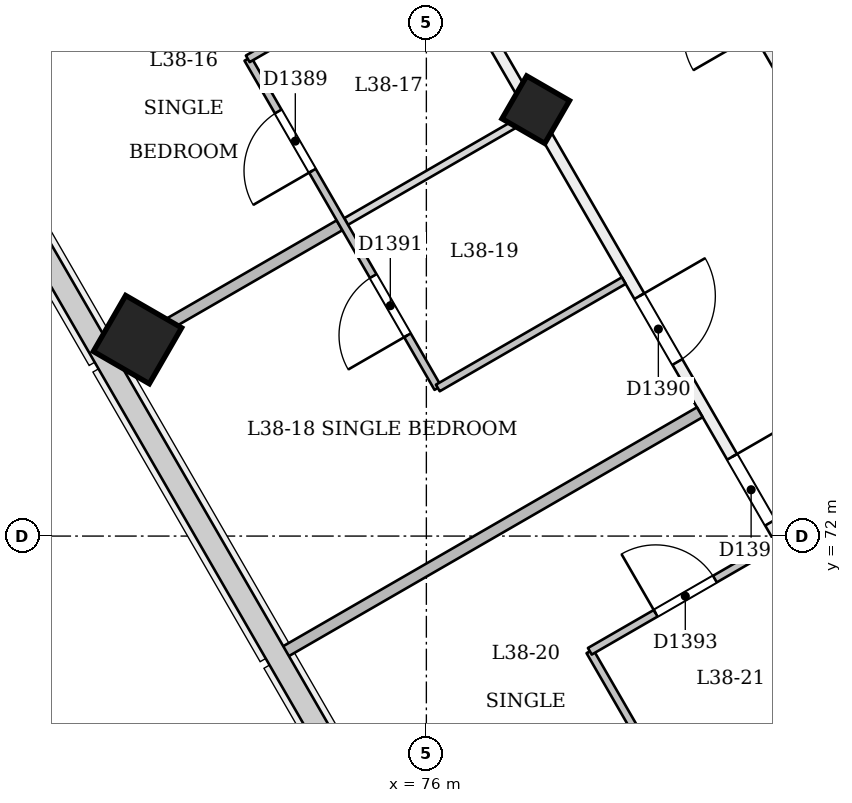
"""IFC4 building model, lengths in metres.
Left out: names, types, materials, properties, quantities, classifications, styles, units other than length and angle.
Written with IfcOpenShell. Run it as: python <this file> out.ifc"""

import sys

from ifc_helpers import new_model, si_unit, direction, frame, frame_2d, origin, origin_2d, place, context, subcontext, project, spatial, rectangle, extrude, element, fill, save


model = new_model("IFC4")
c1 = context("Model", 3, precision=1e-05, world=origin(), true_north=direction((0.0, 1.0)))
c2 = subcontext(c1, "Body", "Model", "MODEL_VIEW")
j1 = project(units=[si_unit("LENGTHUNIT", "METRE"), si_unit("PLANEANGLEUNIT", "RADIAN")], contexts=[c1])
p1 = place(None, origin())
s1 = spatial("IfcSite", under=j1, at=p1, CompositionType="ELEMENT")
p2 = place(p1, origin())
s2 = spatial("IfcBuilding", under=s1, at=p2, CompositionType="ELEMENT")
p3 = place(p2, frame((0.0, 0.0, 149.4)))
s3 = spatial("IfcBuildingStorey", under=s2, at=p3, CompositionType="ELEMENT", Elevation=149.4)
p4 = place(p3, frame((77.412, 77.563, -0.02), z_axis=(0.022222910879, 0.038415824599, 0.999014697916), x_axis=(-0.866021322354, -0.498527672539, 0.038434736118)))
e1 = element("IfcColumn", 1, at=p4, inside=s3, PredefinedType="COLUMN", context=c2, shape_type="SweptSolid", body=[
    extrude(rectangle(XDim=0.65, YDim=0.65, at=origin_2d()), origin(), (0.0, 0.0, 1.0), 3.604),
])
p5 = place(p3, frame((72.172, 74.537, -0.026), z_axis=(0.022155133694, 0.038483534979, 0.999013597298), x_axis=(-0.864979679845, -0.500331165571, 0.038456185646)))
e2 = element("IfcColumn", 2, at=p5, inside=s3, PredefinedType="COLUMN", context=c2, shape_type="SweptSolid", body=[
    extrude(rectangle(XDim=0.85, YDim=0.85, at=origin_2d()), origin(), (0.0, 0.0, 1.0), 3.604),
])
p6 = place(p3, frame((85.0, 70.621, 0.0), z_axis=(0.0, 0.0, 1.0), x_axis=(-0.500003200507, 0.866023555963, 0.0)))
e3 = element("IfcWall", 3, at=p6, inside=s3, PredefinedType="PARTITIONING", context=c2, shape_type="SweptSolid", body=[
    extrude(rectangle(XDim=22.608, YDim=0.15, at=frame_2d((11.304, 0.0))), origin(), (0.0, 0.0, 1.0), 3.15),
])
p7 = place(p6, frame((12.79, 0.0, 0.0)))
e4 = element("IfcOpeningElement", 4, at=p7, cuts=e3, PredefinedType="OPENING", context=c2, shape_type="SweptSolid", body=[
    extrude(rectangle(XDim=0.9, YDim=2.1, at=frame_2d((0.45, 1.05))), frame((0.0, 0.085, 0.0), z_axis=(0.0, -1.0, 0.0), x_axis=(1.0, 0.0, 0.0)), (0.0, 0.0, 1.0), 0.171),
])
p8 = place(p6, frame((19.298, 0.0, 0.0)))
e5 = element("IfcOpeningElement", 5, at=p8, cuts=e3, PredefinedType="OPENING", context=c2, shape_type="SweptSolid", body=[
    extrude(rectangle(XDim=0.9, YDim=2.1, at=frame_2d((0.45, 1.05))), frame((0.0, 0.085, 0.0), z_axis=(0.0, -1.0, 0.0), x_axis=(1.0, 0.0, 0.0)), (0.0, 0.0, 1.0), 0.171),
])
p9 = place(p6, frame((2.619, 0.0, 0.0)))
e6 = element("IfcOpeningElement", 6, at=p9, cuts=e3, PredefinedType="OPENING", context=c2, shape_type="SweptSolid", body=[
    extrude(rectangle(XDim=1.0, YDim=2.1, at=frame_2d((0.5, 1.05))), frame((0.0, 0.085, 0.0), z_axis=(0.0, -1.0, 0.0), x_axis=(1.0, 0.0, 0.0)), (0.0, 0.0, 1.0), 0.171),
])
p10 = place(p6, frame((16.21, 0.0, 0.0)))
e7 = element("IfcOpeningElement", 7, at=p10, cuts=e3, PredefinedType="OPENING", context=c2, shape_type="SweptSolid", body=[
    extrude(rectangle(XDim=1.0, YDim=2.1, at=frame_2d((0.5, 1.05))), frame((0.0, 0.085, 0.0), z_axis=(0.0, -1.0, 0.0), x_axis=(1.0, 0.0, 0.0)), (0.0, 0.0, 1.0), 0.171),
])
p11 = place(p6, frame((9.246, 0.0, 0.0)))
e8 = element("IfcOpeningElement", 8, at=p11, cuts=e3, PredefinedType="OPENING", context=c2, shape_type="SweptSolid", body=[
    extrude(rectangle(XDim=1.0, YDim=2.1, at=frame_2d((0.5, 1.05))), frame((0.0, 0.085, 0.0), z_axis=(0.0, -1.0, 0.0), x_axis=(1.0, 0.0, 0.0)), (0.0, 0.0, 1.0), 0.171),
])
p12 = place(p6, frame((5.892, 0.0, 0.0)))
e9 = element("IfcOpeningElement", 9, at=p12, cuts=e3, PredefinedType="OPENING", context=c2, shape_type="SweptSolid", body=[
    extrude(rectangle(XDim=1.0, YDim=2.1, at=frame_2d((0.5, 1.05))), frame((0.0, 0.085, 0.0), z_axis=(0.0, -1.0, 0.0), x_axis=(1.0, 0.0, 0.0)), (0.0, 0.0, 1.0), 0.171),
])
p13 = place(p3, frame((65.324, 98.5, 0.0), z_axis=(0.0, 0.0, 1.0), x_axis=(0.500001898363, -0.866024307761, 0.0)))
e10 = element("IfcWall", 10, at=p13, inside=s3, PredefinedType="PARTITIONING", context=c2, shape_type="SweptSolid", body=[
    extrude(rectangle(XDim=39.351, YDim=0.15, at=frame_2d((19.675, 0.0))), origin(), (0.0, 0.0, 1.0), 2.75),
])
p14 = place(p13, frame((0.2, 0.0, 0.0)))
e11 = element("IfcOpeningElement", 11, at=p14, cuts=e10, PredefinedType="OPENING", context=c2, shape_type="SweptSolid", body=[
    extrude(rectangle(XDim=1.2, YDim=2.1, at=frame_2d((0.6, 1.05))), frame((0.0, 0.085, 0.0), z_axis=(0.0, -1.0, 0.0), x_axis=(1.0, 0.0, 0.0)), (0.0, 0.0, 1.0), 0.171),
])
p15 = place(p13, frame((3.425, 0.0, 0.0)))
e12 = element("IfcOpeningElement", 12, at=p15, cuts=e10, PredefinedType="OPENING", context=c2, shape_type="SweptSolid", body=[
    extrude(rectangle(XDim=1.0, YDim=2.1, at=frame_2d((0.5, 1.05))), frame((0.0, 0.085, 0.0), z_axis=(0.0, -1.0, 0.0), x_axis=(1.0, 0.0, 0.0)), (0.0, 0.0, 1.0), 0.171),
])
p16 = place(p13, frame((9.004, 0.0, 0.0)))
e13 = element("IfcOpeningElement", 13, at=p16, cuts=e10, PredefinedType="OPENING", context=c2, shape_type="SweptSolid", body=[
    extrude(rectangle(XDim=1.1, YDim=2.1, at=frame_2d((0.55, 1.05))), frame((0.0, 0.085, 0.0), z_axis=(0.0, -1.0, 0.0), x_axis=(1.0, 0.0, 0.0)), (0.0, 0.0, 1.0), 0.171),
])
p17 = place(p13, frame((11.396, 0.0, 0.0)))
e14 = element("IfcOpeningElement", 14, at=p17, cuts=e10, PredefinedType="OPENING", context=c2, shape_type="SweptSolid", body=[
    extrude(rectangle(XDim=1.0, YDim=2.1, at=frame_2d((0.5, 1.05))), frame((0.0, 0.085, 0.0), z_axis=(0.0, -1.0, 0.0), x_axis=(1.0, 0.0, 0.0)), (0.0, 0.0, 1.0), 0.171),
])
p18 = place(p13, frame((17.955, 0.0, 0.0)))
e15 = element("IfcOpeningElement", 15, at=p18, cuts=e10, PredefinedType="OPENING", context=c2, shape_type="SweptSolid", body=[
    extrude(rectangle(XDim=1.0, YDim=2.1, at=frame_2d((0.5, 1.05))), frame((0.0, 0.085, 0.0), z_axis=(0.0, -1.0, 0.0), x_axis=(1.0, 0.0, 0.0)), (0.0, 0.0, 1.0), 0.171),
])
p19 = place(p13, frame((20.396, 0.0, 0.0)))
e16 = element("IfcOpeningElement", 16, at=p19, cuts=e10, PredefinedType="OPENING", context=c2, shape_type="SweptSolid", body=[
    extrude(rectangle(XDim=1.0, YDim=2.1, at=frame_2d((0.5, 1.05))), frame((0.0, 0.085, 0.0), z_axis=(0.0, -1.0, 0.0), x_axis=(1.0, 0.0, 0.0)), (0.0, 0.0, 1.0), 0.171),
])
p20 = place(p13, frame((26.955, 0.0, 0.0)))
e17 = element("IfcOpeningElement", 17, at=p20, cuts=e10, PredefinedType="OPENING", context=c2, shape_type="SweptSolid", body=[
    extrude(rectangle(XDim=1.0, YDim=2.1, at=frame_2d((0.5, 1.05))), frame((0.0, 0.085, 0.0), z_axis=(0.0, -1.0, 0.0), x_axis=(1.0, 0.0, 0.0)), (0.0, 0.0, 1.0), 0.171),
])
p21 = place(p13, frame((29.396, 0.0, 0.0)))
e18 = element("IfcOpeningElement", 18, at=p21, cuts=e10, PredefinedType="OPENING", context=c2, shape_type="SweptSolid", body=[
    extrude(rectangle(XDim=1.0, YDim=2.1, at=frame_2d((0.5, 1.05))), frame((0.0, 0.085, 0.0), z_axis=(0.0, -1.0, 0.0), x_axis=(1.0, 0.0, 0.0)), (0.0, 0.0, 1.0), 0.171),
])
p22 = place(p13, frame((36.004, 0.0, 0.0)))
e19 = element("IfcOpeningElement", 19, at=p22, cuts=e10, PredefinedType="OPENING", context=c2, shape_type="SweptSolid", body=[
    extrude(rectangle(XDim=1.1, YDim=2.1, at=frame_2d((0.55, 1.05))), frame((0.0, 0.085, 0.0), z_axis=(0.0, -1.0, 0.0), x_axis=(1.0, 0.0, 0.0)), (0.0, 0.0, 1.0), 0.171),
])
p23 = place(p3, frame((69.602, 78.25, 0.0), z_axis=(0.0, 0.0, 1.0), x_axis=(0.866025401434, 0.500000004071, 0.0)))
e20 = element("IfcWall", 20, at=p23, inside=s3, PredefinedType="PARTITIONING", context=c2, shape_type="SweptSolid", body=[
    extrude(rectangle(XDim=6.345, YDim=0.15, at=frame_2d((3.173, 0.0))), origin(), (0.0, 0.0, 1.0), 2.65),
])
p24 = place(p3, frame((76.151, 73.948, 0.0), z_axis=(0.0, 0.0, 1.0), x_axis=(-0.500004234368, 0.866022959057, 0.0)))
e21 = element("IfcWall", 21, at=p24, inside=s3, PredefinedType="PARTITIONING", context=c2, shape_type="SweptSolid", body=[
    extrude(rectangle(XDim=5.0, YDim=0.1, at=frame_2d((2.5, 0.0))), origin(), (0.0, 0.0, 1.0), 2.75),
])
p25 = place(p24, frame((3.3, 0.0, 0.0)))
e22 = element("IfcOpeningElement", 22, at=p25, cuts=e21, PredefinedType="OPENING", context=c2, shape_type="SweptSolid", body=[
    extrude(rectangle(XDim=0.9, YDim=2.1, at=frame_2d((0.45, 1.05))), frame((0.0, 0.061, 0.0), z_axis=(0.0, -1.0, 0.0), x_axis=(1.0, 0.0, 0.0)), (0.0, 0.0, 1.0), 0.121),
])
p26 = place(p24, frame((0.8, 0.0, 0.0)))
e23 = element("IfcOpeningElement", 23, at=p26, cuts=e21, PredefinedType="OPENING", context=c2, shape_type="SweptSolid", body=[
    extrude(rectangle(XDim=0.9, YDim=2.1, at=frame_2d((0.45, 1.05))), frame((0.0, 0.061, 0.0), z_axis=(0.0, -1.0, 0.0), x_axis=(1.0, 0.0, 0.0)), (0.0, 0.0, 1.0), 0.121),
])
p27 = place(p3, frame((73.651, 78.279, 0.0), z_axis=(0.0, 0.0, 1.0), x_axis=(0.866048868473, 0.499959355765, 0.0)))
e24 = element("IfcWall", 24, at=p27, inside=s3, PredefinedType="PARTITIONING", context=c2, shape_type="SweptSolid", body=[
    extrude(rectangle(XDim=2.825, YDim=0.1, at=frame_2d((1.413, 0.0))), origin(), (0.0, 0.0, 1.0), 3.15),
])
p28 = place(p3, frame((71.87, 74.364, 0.0), z_axis=(0.0, 0.0, 1.0), x_axis=(0.866044174857, 0.499967486139, 0.0)))
e25 = element("IfcWall", 25, at=p28, inside=s3, PredefinedType="PARTITIONING", context=c2, shape_type="SweptSolid", body=[
    extrude(rectangle(XDim=3.45, YDim=0.15, at=frame_2d((1.725, 0.0))), origin(), (0.0, 0.0, 1.0), 2.65),
])
p29 = place(p3, frame((74.944, 76.138, 0.0), z_axis=(0.0, 0.0, 1.0), x_axis=(0.866042014628, 0.499971228071, 0.0)))
e26 = element("IfcWall", 26, at=p29, inside=s3, PredefinedType="PARTITIONING", context=c2, shape_type="SweptSolid", body=[
    extrude(rectangle(XDim=2.775, YDim=0.1, at=frame_2d((1.388, 0.0))), origin(), (0.0, 0.0, 1.0), 2.75),
])
p30 = place(p3, frame((78.597, 75.361, 0.0), z_axis=(0.0, 0.0, 1.0), x_axis=(-0.866048868473, -0.499959355765, 0.0)))
e27 = element("IfcWall", 27, at=p30, inside=s3, PredefinedType="PARTITIONING", context=c2, shape_type="SweptSolid", body=[
    extrude(rectangle(XDim=2.825, YDim=0.1, at=frame_2d((1.413, 0.0))), origin(), (0.0, 0.0, 1.0), 3.15),
])
p31 = place(p3, frame((74.102, 70.456, 0.0), z_axis=(0.0, 0.0, 1.0), x_axis=(0.866025401434, 0.500000004071, 0.0)))
e28 = element("IfcWall", 28, at=p31, inside=s3, PredefinedType="PARTITIONING", context=c2, shape_type="SweptSolid", body=[
    extrude(rectangle(XDim=6.345, YDim=0.15, at=frame_2d((3.173, 0.0))), origin(), (0.0, 0.0, 1.0), 2.65),
])
p32 = place(p3, frame((79.376, 68.363, 0.0), z_axis=(0.0, 0.0, 1.0), x_axis=(-0.499943856944, 0.866057815567, 0.0)))
e29 = element("IfcWall", 29, at=p32, inside=s3, PredefinedType="PARTITIONING", context=c2, shape_type="SweptSolid", body=[
    extrude(rectangle(XDim=2.45, YDim=0.1, at=frame_2d((1.225, 0.0))), origin(), (0.0, 0.0, 1.0), 2.75),
])
p33 = place(p3, frame((78.151, 70.484, 0.0), z_axis=(0.0, 0.0, 1.0), x_axis=(0.866048868473, 0.499959355765, 0.0)))
e30 = element("IfcWall", 30, at=p33, inside=s3, PredefinedType="PARTITIONING", context=c2, shape_type="SweptSolid", body=[
    extrude(rectangle(XDim=2.825, YDim=0.1, at=frame_2d((1.413, 0.0))), origin(), (0.0, 0.0, 1.0), 3.15),
])
p34 = place(p33, frame((1.0, 0.0, 0.0)))
e31 = element("IfcOpeningElement", 31, at=p34, cuts=e30, PredefinedType="OPENING", context=c2, shape_type="SweptSolid", body=[
    extrude(rectangle(XDim=0.9, YDim=2.1, at=frame_2d((0.45, 1.05))), frame((0.0, 0.061, 0.0), z_axis=(0.0, -1.0, 0.0), x_axis=(1.0, 0.0, 0.0)), (0.0, 0.0, 1.0), 0.121),
])
p35 = place(p3, frame((78.881, 68.019, 0.0), z_axis=(0.0, 0.0, 1.0), x_axis=(0.866050272892, 0.499956922968, 0.0)))
e32 = element("IfcWall", 32, at=p35, inside=s3, PredefinedType="PARTITIONING", context=c2, shape_type="SweptSolid", body=[
    extrude(rectangle(XDim=3.425, YDim=0.1, at=frame_2d((1.712, 0.0))), origin(), (0.0, 0.0, 1.0), 2.75),
])
p36 = place(p25, origin())
e33 = element("IfcDoor", 33, at=p36, inside=s3, OperationType="SINGLE_SWING_LEFT", PredefinedType="NOTDEFINED", context=c2, shape_type="SweptSolid", body=[
    extrude(rectangle(XDim=0.9, YDim=2.1, at=frame_2d((0.45, 1.05))), frame((0.0, 0.025, 0.0), z_axis=(0.0, -1.0, 0.0), x_axis=(1.0, 0.0, 0.0)), (0.0, 0.0, 1.0), 0.05),
])
fill(e22, e33)
p37 = place(p20, origin())
e34 = element("IfcDoor", 34, at=p37, inside=s3, OperationType="SINGLE_SWING_LEFT", PredefinedType="NOTDEFINED", context=c2, shape_type="SweptSolid", body=[
    extrude(rectangle(XDim=1.0, YDim=2.1, at=frame_2d((0.5, 1.05))), frame((0.0, 0.025, 0.0), z_axis=(0.0, -1.0, 0.0), x_axis=(1.0, 0.0, 0.0)), (0.0, 0.0, 1.0), 0.05),
])
fill(e17, e34)
p38 = place(p26, origin())
e35 = element("IfcDoor", 35, at=p38, inside=s3, OperationType="SINGLE_SWING_LEFT", PredefinedType="NOTDEFINED", context=c2, shape_type="SweptSolid", body=[
    extrude(rectangle(XDim=0.9, YDim=2.1, at=frame_2d((0.45, 1.05))), frame((0.0, 0.025, 0.0), z_axis=(0.0, -1.0, 0.0), x_axis=(1.0, 0.0, 0.0)), (0.0, 0.0, 1.0), 0.05),
])
fill(e23, e35)
p39 = place(p21, origin())
e36 = element("IfcDoor", 36, at=p39, inside=s3, OperationType="SINGLE_SWING_LEFT", PredefinedType="NOTDEFINED", context=c2, shape_type="SweptSolid", body=[
    extrude(rectangle(XDim=1.0, YDim=2.1, at=frame_2d((0.5, 1.05))), frame((0.0, 0.025, 0.0), z_axis=(0.0, -1.0, 0.0), x_axis=(1.0, 0.0, 0.0)), (0.0, 0.0, 1.0), 0.05),
])
fill(e18, e36)
p40 = place(p34, origin())
e37 = element("IfcDoor", 37, at=p40, inside=s3, OperationType="SINGLE_SWING_LEFT", PredefinedType="NOTDEFINED", context=c2, shape_type="SweptSolid", body=[
    extrude(rectangle(XDim=0.9, YDim=2.1, at=frame_2d((0.45, 1.05))), frame((0.0, 0.025, 0.0), z_axis=(0.0, -1.0, 0.0), x_axis=(1.0, 0.0, 0.0)), (0.0, 0.0, 1.0), 0.05),
])
fill(e31, e37)
save(model, sys.argv[1])
